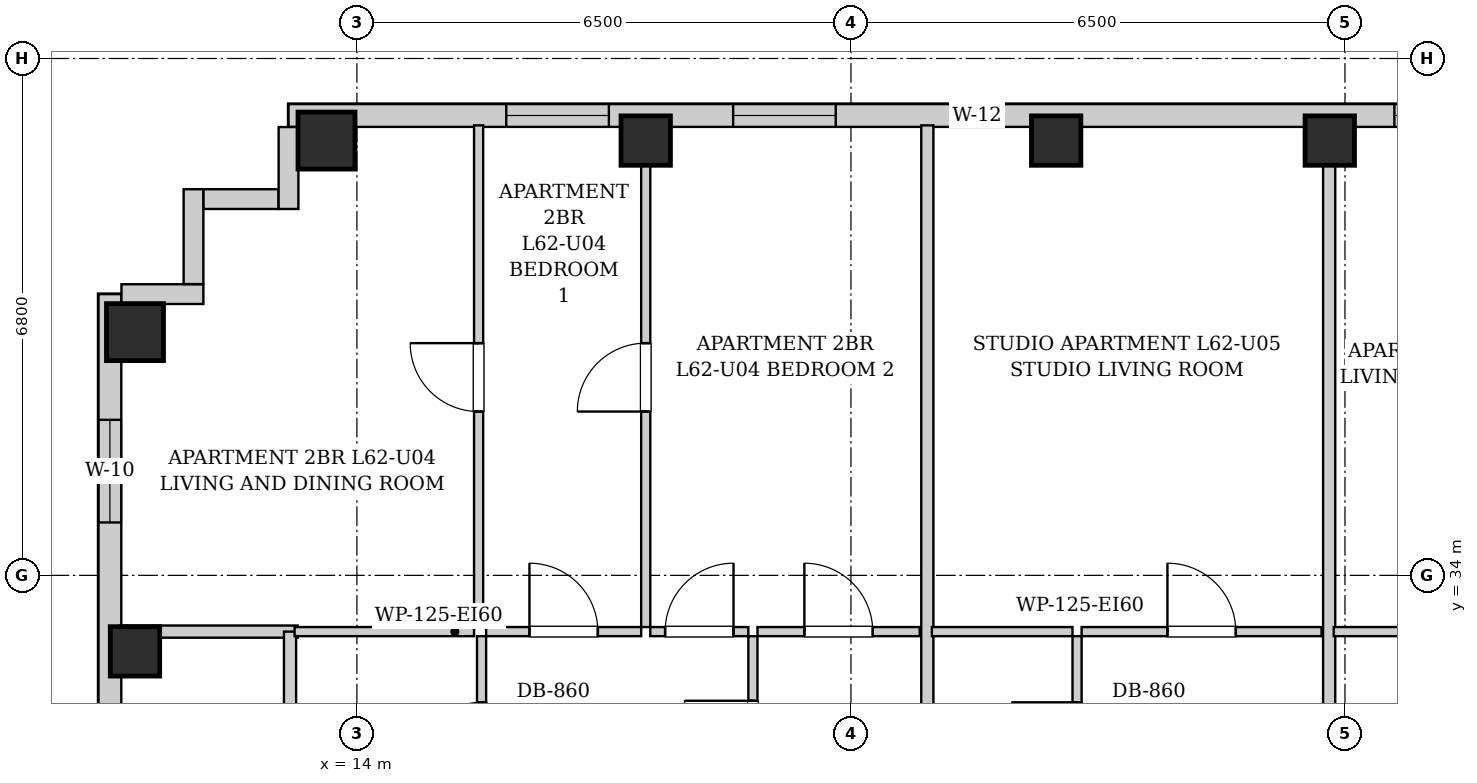
"""IFC4 building model, lengths in metres.
Left out: names, types, materials, properties, quantities, classifications, styles, units other than length and angle.
Written with IfcOpenShell. Run it as: python <this file> out.ifc"""

import sys

from ifc_helpers import new_model, si_unit, direction, frame, frame_2d, origin, origin_2d, place, context, subcontext, project, spatial, rectangle, extrude, element, fill, save


model = new_model("IFC4")
c1 = context("Model", 3, precision=1e-05, world=origin(), true_north=direction((0.0, 1.0)))
c2 = subcontext(c1, "Body", "Model", "MODEL_VIEW")
j1 = project(units=[si_unit("LENGTHUNIT", "METRE"), si_unit("PLANEANGLEUNIT", "RADIAN")], contexts=[c1])
p1 = place(None, origin())
s1 = spatial("IfcSite", under=j1, at=p1, CompositionType="ELEMENT")
p2 = place(p1, origin())
s2 = spatial("IfcBuilding", under=s1, at=p2, CompositionType="ELEMENT")
p3 = place(p2, frame((0.0, 0.0, 214.0)))
s3 = spatial("IfcBuildingStorey", under=s2, at=p3, CompositionType="ELEMENT", Elevation=214.0)
p4 = place(p3, frame((13.6, 39.72, 0.0), z_axis=(0.0, 0.0, 1.0), x_axis=(1.0, 0.0, 0.0)))
e1 = element("IfcColumn", 1, at=p4, inside=s3, PredefinedType="COLUMN", context=c2, shape_type="SweptSolid", body=[
    extrude(rectangle(XDim=0.75, YDim=0.75, at=origin_2d()), origin(), (0.0, 0.0, 1.0), 3.3),
])
for number, where, z_axis, x_axis in (
    (2, (17.8, 39.72, 0.0), (0.0, 0.0, 1.0), (1.0, 0.0, 0.0)),
    (3, (23.2, 39.72, 0.0), (0.0, 0.0, 1.0), (1.0, 0.0, 0.0)),
    (4, (26.8, 39.72, 0.0), (0.0, 0.0, 1.0), (1.0, 0.0, 0.0)),
    (5, (11.08, 33.0, 0.0), (0.0, 0.0, 1.0), (1.0, 0.0, 0.0)),
):
    element("IfcColumn", number, at=place(p3, frame(where, z_axis=z_axis, x_axis=x_axis)), inside=s3, PredefinedType="COLUMN", context=c2, shape_type="SweptSolid", body=[
        extrude(rectangle(XDim=0.65, YDim=0.65, at=origin_2d()), origin(), (0.0, 0.0, 1.0), 3.3),
    ])
p5 = place(p3, frame((11.08, 37.2, 0.0), z_axis=(0.0, 0.0, 1.0), x_axis=(1.0, 0.0, 0.0)))
e6 = element("IfcColumn", 6, at=p5, inside=s3, PredefinedType="COLUMN", context=c2, shape_type="SweptSolid", body=[
    extrude(rectangle(XDim=0.75, YDim=0.75, at=origin_2d()), origin(), (0.0, 0.0, 1.0), 3.3),
])
p6 = place(p3, frame((13.1, 40.05, 0.0), z_axis=(0.0, 0.0, 1.0), x_axis=(1.0, 0.0, 0.0)))
e7 = element("IfcWall", 7, at=p6, inside=s3, PredefinedType="SOLIDWALL", context=c2, shape_type="SweptSolid", body=[
    extrude(rectangle(XDim=16.95, YDim=0.3, at=frame_2d((8.475, 0.0))), origin(), (0.0, 0.0, 1.0), 3.04),
])
p7 = place(p6, frame((2.865, 0.0, 0.55)))
e8 = element("IfcOpeningElement", 8, at=p7, cuts=e7, PredefinedType="OPENING", context=c2, shape_type="SweptSolid", body=[
    extrude(rectangle(XDim=1.35, YDim=1.2, at=frame_2d((0.675, 0.6))), frame((0.0, 0.16, 0.0), z_axis=(0.0, -1.0, 0.0), x_axis=(1.0, 0.0, 0.0)), (0.0, 0.0, 1.0), 0.32),
])
p8 = place(p6, frame((5.85, 0.0, 0.55)))
e9 = element("IfcOpeningElement", 9, at=p8, cuts=e7, PredefinedType="OPENING", context=c2, shape_type="SweptSolid", body=[
    extrude(rectangle(XDim=1.35, YDim=1.2, at=frame_2d((0.675, 0.6))), frame((0.0, 0.16, 0.0), z_axis=(0.0, -1.0, 0.0), x_axis=(1.0, 0.0, 0.0)), (0.0, 0.0, 1.0), 0.32),
])
p9 = place(p6, frame((8.72, 0.0, 0.55)))
e10 = element("IfcOpeningElement", 10, at=p9, cuts=e7, PredefinedType="OPENING", context=c2, shape_type="SweptSolid", body=[
    extrude(rectangle(XDim=0.68, YDim=1.2, at=frame_2d((0.34, 0.6))), frame((0.0, 0.16, 0.0), z_axis=(0.0, -1.0, 0.0), x_axis=(1.0, 0.0, 0.0)), (0.0, 0.0, 1.0), 0.32),
])
p10 = place(p6, frame((14.55, 0.0, 0.55)))
e11 = element("IfcOpeningElement", 11, at=p10, cuts=e7, PredefinedType="OPENING", context=c2, shape_type="SweptSolid", body=[
    extrude(rectangle(XDim=1.35, YDim=1.2, at=frame_2d((0.675, 0.6))), frame((0.0, 0.16, 0.0), z_axis=(0.0, -1.0, 0.0), x_axis=(1.0, 0.0, 0.0)), (0.0, 0.0, 1.0), 0.32),
])
p11 = place(p3, frame((10.75, 6.3, 0.0), z_axis=(0.0, 0.0, 1.0), x_axis=(0.0, 1.0, 0.0)))
e12 = element("IfcWall", 12, at=p11, inside=s3, PredefinedType="SOLIDWALL", context=c2, shape_type="SweptSolid", body=[
    extrude(rectangle(XDim=31.4, YDim=0.3, at=frame_2d((15.7, 0.0))), origin(), (0.0, 0.0, 1.0), 3.04),
])
p12 = place(p11, frame((28.396, 0.0, 0.55)))
e13 = element("IfcOpeningElement", 13, at=p12, cuts=e12, PredefinedType="OPENING", context=c2, shape_type="SweptSolid", body=[
    extrude(rectangle(XDim=1.35, YDim=1.2, at=frame_2d((0.675, 0.6))), frame((0.0, 0.16, 0.0), z_axis=(0.0, -1.0, 0.0), x_axis=(1.0, 0.0, 0.0)), (0.0, 0.0, 1.0), 0.32),
])
p13 = place(p11, frame((10.367, 0.0, 0.55)))
e14 = element("IfcOpeningElement", 14, at=p13, cuts=e12, PredefinedType="OPENING", context=c2, shape_type="SweptSolid", body=[
    extrude(rectangle(XDim=1.35, YDim=1.2, at=frame_2d((0.675, 0.6))), frame((0.0, 0.16, 0.0), z_axis=(0.0, -1.0, 0.0), x_axis=(1.0, 0.0, 0.0)), (0.0, 0.0, 1.0), 0.32),
])
p14 = place(p11, frame((19.683, 0.0, 0.55)))
e15 = element("IfcOpeningElement", 15, at=p14, cuts=e12, PredefinedType="OPENING", context=c2, shape_type="SweptSolid", body=[
    extrude(rectangle(XDim=1.35, YDim=1.2, at=frame_2d((0.675, 0.6))), frame((0.0, 0.16, 0.0), z_axis=(0.0, -1.0, 0.0), x_axis=(1.0, 0.0, 0.0)), (0.0, 0.0, 1.0), 0.32),
])
p15 = place(p3, frame((10.902, 37.7, 0.0), z_axis=(0.0, 0.0, 1.0), x_axis=(1.0, 0.0, 0.0)))
e16 = element("IfcWall", 16, at=p15, inside=s3, PredefinedType="SOLIDWALL", context=c2, shape_type="SweptSolid", body=[
    extrude(rectangle(XDim=1.078, YDim=0.26, at=frame_2d((0.539, 0.0))), origin(), (0.0, 0.0, 1.0), 3.04),
])
p16 = place(p3, frame((11.85, 37.832, 0.0), z_axis=(0.0, 0.0, 1.0), x_axis=(0.0, 1.0, 0.0)))
e17 = element("IfcWall", 17, at=p16, inside=s3, PredefinedType="SOLIDWALL", context=c2, shape_type="SweptSolid", body=[
    extrude(rectangle(XDim=1.248, YDim=0.26, at=frame_2d((0.624, 0.0))), origin(), (0.0, 0.0, 1.0), 3.04),
])
p17 = place(p3, frame((11.982, 38.95, 0.0), z_axis=(0.0, 0.0, 1.0), x_axis=(1.0, 0.0, 0.0)))
e18 = element("IfcWall", 18, at=p17, inside=s3, PredefinedType="SOLIDWALL", context=c2, shape_type="SweptSolid", body=[
    extrude(rectangle(XDim=0.986, YDim=0.26, at=frame_2d((0.493, 0.0))), origin(), (0.0, 0.0, 1.0), 3.04),
])
p18 = place(p3, frame((13.1, 38.82, 0.0), z_axis=(0.0, 0.0, 1.0), x_axis=(0.0, 1.0, 0.0)))
e19 = element("IfcWall", 19, at=p18, inside=s3, PredefinedType="SOLIDWALL", context=c2, shape_type="SweptSolid", body=[
    extrude(rectangle(XDim=1.078, YDim=0.26, at=frame_2d((0.539, 0.0))), origin(), (0.0, 0.0, 1.0), 3.04),
])
p19 = place(p3, frame((10.88, 33.26, 0.0), z_axis=(0.0, 0.0, 1.0), x_axis=(1.0, 0.0, 0.0)))
e20 = element("IfcWall", 20, at=p19, inside=s3, PredefinedType="PARTITIONING", context=c2, shape_type="SweptSolid", body=[
    extrude(rectangle(XDim=2.34, YDim=0.16, at=frame_2d((1.17, 0.0))), origin(), (0.0, 0.0, 1.0), 3.04),
])
p20 = place(p3, frame((13.12, 30.6, 0.0), z_axis=(0.0, 0.0, 1.0), x_axis=(0.0, 1.0, 0.0)))
e21 = element("IfcWall", 21, at=p20, inside=s3, PredefinedType="PARTITIONING", context=c2, shape_type="SweptSolid", body=[
    extrude(rectangle(XDim=2.66, YDim=0.16, at=frame_2d((1.33, 0.0))), origin(), (0.0, 0.0, 1.0), 3.04),
])
p21 = place(p3, frame((15.64, 30.6, 0.0), z_axis=(0.0, 0.0, 1.0), x_axis=(0.0, 1.0, 0.0)))
e22 = element("IfcWall", 22, at=p21, inside=s3, PredefinedType="PARTITIONING", context=c2, shape_type="SweptSolid", body=[
    extrude(rectangle(XDim=2.6, YDim=0.12, at=frame_2d((1.3, 0.0))), origin(), (0.0, 0.0, 1.0), 3.04),
])
p22 = place(p21, frame((0.87, 0.0, 0.0)))
e23 = element("IfcOpeningElement", 23, at=p22, cuts=e22, PredefinedType="OPENING", context=c2, shape_type="SweptSolid", body=[
    extrude(rectangle(XDim=0.86, YDim=2.05, at=frame_2d((0.43, 1.025))), frame((0.0, 0.07, 0.0), z_axis=(0.0, -1.0, 0.0), x_axis=(1.0, 0.0, 0.0)), (0.0, 0.0, 1.0), 0.14),
])
p23 = place(p3, frame((13.18, 33.26, 0.0), z_axis=(0.0, 0.0, 1.0), x_axis=(1.0, 0.0, 0.0)))
e24 = element("IfcWall", 24, at=p23, inside=s3, PredefinedType="PARTITIONING", context=c2, shape_type="SweptSolid", body=[
    extrude(rectangle(XDim=2.361, YDim=0.12, at=frame_2d((1.181, 0.0))), origin(), (0.0, 0.0, 1.0), 3.04),
])
p24 = place(p3, frame((19.21, 30.6, 0.0), z_axis=(0.0, 0.0, 1.0), x_axis=(0.0, 1.0, 0.0)))
e25 = element("IfcWall", 25, at=p24, inside=s3, PredefinedType="PARTITIONING", context=c2, shape_type="SweptSolid", body=[
    extrude(rectangle(XDim=2.6, YDim=0.12, at=frame_2d((1.3, 0.0))), origin(), (0.0, 0.0, 1.0), 3.04),
])
p25 = place(p24, frame((0.85, 0.0, 0.0)))
e26 = element("IfcOpeningElement", 26, at=p25, cuts=e25, PredefinedType="OPENING", context=c2, shape_type="SweptSolid", body=[
    extrude(rectangle(XDim=0.9, YDim=2.05, at=frame_2d((0.45, 1.025))), frame((0.0, 0.07, 0.0), z_axis=(0.0, -1.0, 0.0), x_axis=(1.0, 0.0, 0.0)), (0.0, 0.0, 1.0), 0.14),
])
p26 = place(p3, frame((15.7, 33.26, 0.0), z_axis=(0.0, 0.0, 1.0), x_axis=(1.0, 0.0, 0.0)))
e27 = element("IfcWall", 27, at=p26, inside=s3, PredefinedType="PARTITIONING", context=c2, shape_type="SweptSolid", body=[
    extrude(rectangle(XDim=2.04, YDim=0.12, at=frame_2d((1.02, 0.0))), origin(), (0.0, 0.0, 1.0), 3.04),
])
p27 = place(p26, frame((0.57, 0.0, 0.0)))
e28 = element("IfcOpeningElement", 28, at=p27, cuts=e27, PredefinedType="OPENING", context=c2, shape_type="SweptSolid", body=[
    extrude(rectangle(XDim=0.9, YDim=2.05, at=frame_2d((0.45, 1.025))), frame((0.0, 0.07, 0.0), z_axis=(0.0, -1.0, 0.0), x_axis=(1.0, 0.0, 0.0)), (0.0, 0.0, 1.0), 0.14),
])
p28 = place(p3, frame((17.86, 33.26, 0.0), z_axis=(0.0, 0.0, 1.0), x_axis=(1.0, 0.0, 0.0)))
e29 = element("IfcWall", 29, at=p28, inside=s3, PredefinedType="PARTITIONING", context=c2, shape_type="SweptSolid", body=[
    extrude(rectangle(XDim=1.29, YDim=0.12, at=frame_2d((0.645, 0.0))), origin(), (0.0, 0.0, 1.0), 3.04),
])
p29 = place(p28, frame((0.195, 0.0, 0.0)))
e30 = element("IfcOpeningElement", 30, at=p29, cuts=e29, PredefinedType="OPENING", context=c2, shape_type="SweptSolid", body=[
    extrude(rectangle(XDim=0.9, YDim=2.05, at=frame_2d((0.45, 1.025))), frame((0.0, 0.07, 0.0), z_axis=(0.0, -1.0, 0.0), x_axis=(1.0, 0.0, 0.0)), (0.0, 0.0, 1.0), 0.14),
])
p30 = place(p3, frame((19.27, 33.26, 0.0), z_axis=(0.0, 0.0, 1.0), x_axis=(1.0, 0.0, 0.0)))
e31 = element("IfcWall", 31, at=p30, inside=s3, PredefinedType="PARTITIONING", context=c2, shape_type="SweptSolid", body=[
    extrude(rectangle(XDim=2.135, YDim=0.12, at=frame_2d((1.067, 0.0))), origin(), (0.0, 0.0, 1.0), 3.04),
])
p31 = place(p30, frame((0.617, 0.0, 0.0)))
e32 = element("IfcOpeningElement", 32, at=p31, cuts=e31, PredefinedType="OPENING", context=c2, shape_type="SweptSolid", body=[
    extrude(rectangle(XDim=0.9, YDim=2.05, at=frame_2d((0.45, 1.025))), frame((0.0, 0.07, 0.0), z_axis=(0.0, -1.0, 0.0), x_axis=(1.0, 0.0, 0.0)), (0.0, 0.0, 1.0), 0.14),
])
p32 = place(p3, frame((15.601, 33.32, 0.0), z_axis=(0.0, 0.0, 1.0), x_axis=(0.0, 1.0, 0.0)))
e33 = element("IfcWall", 33, at=p32, inside=s3, PredefinedType="PARTITIONING", context=c2, shape_type="SweptSolid", body=[
    extrude(rectangle(XDim=6.6, YDim=0.12, at=frame_2d((3.3, 0.0))), origin(), (0.0, 0.0, 1.0), 3.04),
])
p33 = place(p32, frame((2.835, 0.0, 0.0)))
e34 = element("IfcOpeningElement", 34, at=p33, cuts=e33, PredefinedType="OPENING", context=c2, shape_type="SweptSolid", body=[
    extrude(rectangle(XDim=0.9, YDim=2.05, at=frame_2d((0.45, 1.025))), frame((0.0, 0.07, 0.0), z_axis=(0.0, -1.0, 0.0), x_axis=(1.0, 0.0, 0.0)), (0.0, 0.0, 1.0), 0.14),
])
p34 = place(p3, frame((17.8, 33.32, 0.0), z_axis=(0.0, 0.0, 1.0), x_axis=(0.0, 1.0, 0.0)))
e35 = element("IfcWall", 35, at=p34, inside=s3, PredefinedType="PARTITIONING", context=c2, shape_type="SweptSolid", body=[
    extrude(rectangle(XDim=6.6, YDim=0.12, at=frame_2d((3.3, 0.0))), origin(), (0.0, 0.0, 1.0), 2.556),
])
p35 = place(p34, frame((2.835, 0.0, 0.0)))
e36 = element("IfcOpeningElement", 36, at=p35, cuts=e35, PredefinedType="OPENING", context=c2, shape_type="SweptSolid", body=[
    extrude(rectangle(XDim=0.9, YDim=2.05, at=frame_2d((0.45, 1.025))), frame((0.0, 0.07, 0.0), z_axis=(0.0, -1.0, 0.0), x_axis=(1.0, 0.0, 0.0)), (0.0, 0.0, 1.0), 0.14),
])
p36 = place(p3, frame((21.505, 30.6, 0.0), z_axis=(0.0, 0.0, 1.0), x_axis=(0.0, 1.0, 0.0)))
e37 = element("IfcWall", 37, at=p36, inside=s3, PredefinedType="PARTITIONING", context=c2, shape_type="SweptSolid", body=[
    extrude(rectangle(XDim=9.32, YDim=0.16, at=frame_2d((4.66, 0.0))), origin(), (0.0, 0.0, 1.0), 3.04),
])
p37 = place(p3, frame((23.475, 30.6, 0.0), z_axis=(0.0, 0.0, 1.0), x_axis=(0.0, 1.0, 0.0)))
e38 = element("IfcWall", 38, at=p37, inside=s3, PredefinedType="PARTITIONING", context=c2, shape_type="SweptSolid", body=[
    extrude(rectangle(XDim=2.6, YDim=0.12, at=frame_2d((1.3, 0.0))), origin(), (0.0, 0.0, 1.0), 3.04),
])
p38 = place(p37, frame((0.87, 0.0, 0.0)))
e39 = element("IfcOpeningElement", 39, at=p38, cuts=e38, PredefinedType="OPENING", context=c2, shape_type="SweptSolid", body=[
    extrude(rectangle(XDim=0.86, YDim=2.05, at=frame_2d((0.43, 1.025))), frame((0.0, 0.07, 0.0), z_axis=(0.0, -1.0, 0.0), x_axis=(1.0, 0.0, 0.0)), (0.0, 0.0, 1.0), 0.14),
])
p39 = place(p3, frame((21.565, 33.26, 0.0), z_axis=(0.0, 0.0, 1.0), x_axis=(1.0, 0.0, 0.0)))
e40 = element("IfcWall", 40, at=p39, inside=s3, PredefinedType="PARTITIONING", context=c2, shape_type="SweptSolid", body=[
    extrude(rectangle(XDim=1.85, YDim=0.12, at=frame_2d((0.925, 0.0))), origin(), (0.0, 0.0, 1.0), 3.04),
])
p40 = place(p3, frame((23.535, 33.26, 0.0), z_axis=(0.0, 0.0, 1.0), x_axis=(1.0, 0.0, 0.0)))
e41 = element("IfcWall", 41, at=p40, inside=s3, PredefinedType="PARTITIONING", context=c2, shape_type="SweptSolid", body=[
    extrude(rectangle(XDim=3.157, YDim=0.12, at=frame_2d((1.579, 0.0))), origin(), (0.0, 0.0, 1.0), 3.04),
])
p41 = place(p40, frame((1.129, 0.0, 0.0)))
e42 = element("IfcOpeningElement", 42, at=p41, cuts=e41, PredefinedType="OPENING", context=c2, shape_type="SweptSolid", body=[
    extrude(rectangle(XDim=0.9, YDim=2.05, at=frame_2d((0.45, 1.025))), frame((0.0, 0.07, 0.0), z_axis=(0.0, -1.0, 0.0), x_axis=(1.0, 0.0, 0.0)), (0.0, 0.0, 1.0), 0.14),
])
p42 = place(p3, frame((26.792, 30.6, 0.0), z_axis=(0.0, 0.0, 1.0), x_axis=(0.0, 1.0, 0.0)))
e43 = element("IfcWall", 43, at=p42, inside=s3, PredefinedType="PARTITIONING", context=c2, shape_type="SweptSolid", body=[
    extrude(rectangle(XDim=9.32, YDim=0.16, at=frame_2d((4.66, 0.0))), origin(), (0.0, 0.0, 1.0), 3.04),
])
p43 = place(p3, frame((26.852, 33.26, 0.0), z_axis=(0.0, 0.0, 1.0), x_axis=(1.0, 0.0, 0.0)))
e44 = element("IfcWall", 44, at=p43, inside=s3, PredefinedType="PARTITIONING", context=c2, shape_type="SweptSolid", body=[
    extrude(rectangle(XDim=2.4, YDim=0.12, at=frame_2d((1.2, 0.0))), origin(), (0.0, 0.0, 1.0), 3.04),
])
p44 = place(p22, origin())
e45 = element("IfcDoor", 45, at=p44, inside=s3, OperationType="SINGLE_SWING_LEFT", PredefinedType="DOOR", context=c2, shape_type="SweptSolid", body=[
    extrude(rectangle(XDim=0.86, YDim=2.05, at=frame_2d((0.43, 1.025))), frame((0.0, 0.025, 0.0), z_axis=(0.0, -1.0, 0.0), x_axis=(1.0, 0.0, 0.0)), (0.0, 0.0, 1.0), 0.05),
])
fill(e23, e45)
p45 = place(p25, origin())
e46 = element("IfcDoor", 46, at=p45, inside=s3, OperationType="SINGLE_SWING_RIGHT", PredefinedType="DOOR", context=c2, shape_type="SweptSolid", body=[
    extrude(rectangle(XDim=0.9, YDim=2.05, at=frame_2d((0.45, 1.025))), frame((0.0, 0.025, 0.0), z_axis=(0.0, -1.0, 0.0), x_axis=(1.0, 0.0, 0.0)), (0.0, 0.0, 1.0), 0.05),
])
fill(e26, e46)
p46 = place(p27, origin())
e47 = element("IfcDoor", 47, at=p46, inside=s3, OperationType="SINGLE_SWING_LEFT", PredefinedType="DOOR", context=c2, shape_type="SweptSolid", body=[
    extrude(rectangle(XDim=0.9, YDim=2.05, at=frame_2d((0.45, 1.025))), frame((0.0, 0.025, 0.0), z_axis=(0.0, -1.0, 0.0), x_axis=(1.0, 0.0, 0.0)), (0.0, 0.0, 1.0), 0.05),
])
fill(e28, e47)
p47 = place(p29, origin())
e48 = element("IfcDoor", 48, at=p47, inside=s3, OperationType="SINGLE_SWING_RIGHT", PredefinedType="DOOR", context=c2, shape_type="SweptSolid", body=[
    extrude(rectangle(XDim=0.9, YDim=2.05, at=frame_2d((0.45, 1.025))), frame((0.0, 0.025, 0.0), z_axis=(0.0, -1.0, 0.0), x_axis=(1.0, 0.0, 0.0)), (0.0, 0.0, 1.0), 0.05),
])
fill(e30, e48)
p48 = place(p31, origin())
e49 = element("IfcDoor", 49, at=p48, inside=s3, OperationType="SINGLE_SWING_LEFT", PredefinedType="DOOR", context=c2, shape_type="SweptSolid", body=[
    extrude(rectangle(XDim=0.9, YDim=2.05, at=frame_2d((0.45, 1.025))), frame((0.0, 0.025, 0.0), z_axis=(0.0, -1.0, 0.0), x_axis=(1.0, 0.0, 0.0)), (0.0, 0.0, 1.0), 0.05),
])
fill(e32, e49)
p49 = place(p33, origin())
e50 = element("IfcDoor", 50, at=p49, inside=s3, OperationType="SINGLE_SWING_RIGHT", PredefinedType="DOOR", context=c2, shape_type="SweptSolid", body=[
    extrude(rectangle(XDim=0.9, YDim=2.05, at=frame_2d((0.45, 1.025))), frame((0.0, 0.025, 0.0), z_axis=(0.0, -1.0, 0.0), x_axis=(1.0, 0.0, 0.0)), (0.0, 0.0, 1.0), 0.05),
])
fill(e34, e50)
p50 = place(p35, origin())
e51 = element("IfcDoor", 51, at=p50, inside=s3, OperationType="SINGLE_SWING_LEFT", PredefinedType="DOOR", context=c2, shape_type="SweptSolid", body=[
    extrude(rectangle(XDim=0.9, YDim=2.05, at=frame_2d((0.45, 1.025))), frame((0.0, 0.025, 0.0), z_axis=(0.0, -1.0, 0.0), x_axis=(1.0, 0.0, 0.0)), (0.0, 0.0, 1.0), 0.05),
])
fill(e36, e51)
p51 = place(p38, origin())
e52 = element("IfcDoor", 52, at=p51, inside=s3, OperationType="SINGLE_SWING_RIGHT", PredefinedType="DOOR", context=c2, shape_type="SweptSolid", body=[
    extrude(rectangle(XDim=0.86, YDim=2.05, at=frame_2d((0.43, 1.025))), frame((0.0, 0.025, 0.0), z_axis=(0.0, -1.0, 0.0), x_axis=(1.0, 0.0, 0.0)), (0.0, 0.0, 1.0), 0.05),
])
fill(e39, e52)
p52 = place(p41, origin())
e53 = element("IfcDoor", 53, at=p52, inside=s3, OperationType="SINGLE_SWING_LEFT", PredefinedType="DOOR", context=c2, shape_type="SweptSolid", body=[
    extrude(rectangle(XDim=0.9, YDim=2.05, at=frame_2d((0.45, 1.025))), frame((0.0, 0.025, 0.0), z_axis=(0.0, -1.0, 0.0), x_axis=(1.0, 0.0, 0.0)), (0.0, 0.0, 1.0), 0.05),
])
fill(e42, e53)
p53 = place(p12, origin())
e54 = element("IfcWindow", 54, at=p53, inside=s3, PartitioningType="SINGLE_PANEL", PredefinedType="WINDOW", context=c2, shape_type="SweptSolid", body=[
    extrude(rectangle(XDim=1.35, YDim=1.2, at=frame_2d((0.675, 0.6))), frame((0.0, 0.03, 0.0), z_axis=(0.0, -1.0, 0.0), x_axis=(1.0, 0.0, 0.0)), (0.0, 0.0, 1.0), 0.06),
])
fill(e13, e54)
p54 = place(p7, origin())
e55 = element("IfcWindow", 55, at=p54, inside=s3, PartitioningType="SINGLE_PANEL", PredefinedType="WINDOW", context=c2, shape_type="SweptSolid", body=[
    extrude(rectangle(XDim=1.35, YDim=1.2, at=frame_2d((0.675, 0.6))), frame((0.0, 0.03, 0.0), z_axis=(0.0, -1.0, 0.0), x_axis=(1.0, 0.0, 0.0)), (0.0, 0.0, 1.0), 0.06),
])
fill(e8, e55)
p55 = place(p8, origin())
e56 = element("IfcWindow", 56, at=p55, inside=s3, PartitioningType="SINGLE_PANEL", PredefinedType="WINDOW", context=c2, shape_type="SweptSolid", body=[
    extrude(rectangle(XDim=1.35, YDim=1.2, at=frame_2d((0.675, 0.6))), frame((0.0, 0.03, 0.0), z_axis=(0.0, -1.0, 0.0), x_axis=(1.0, 0.0, 0.0)), (0.0, 0.0, 1.0), 0.06),
])
fill(e9, e56)
p56 = place(p9, origin())
e57 = element("IfcWindow", 57, at=p56, inside=s3, PartitioningType="SINGLE_PANEL", PredefinedType="WINDOW", context=c2, shape_type="SweptSolid", body=[
    extrude(rectangle(XDim=0.68, YDim=1.2, at=frame_2d((0.34, 0.6))), frame((0.0, 0.03, 0.0), z_axis=(0.0, -1.0, 0.0), x_axis=(1.0, 0.0, 0.0)), (0.0, 0.0, 1.0), 0.06),
])
fill(e10, e57)
p57 = place(p10, origin())
e58 = element("IfcWindow", 58, at=p57, inside=s3, PartitioningType="SINGLE_PANEL", PredefinedType="WINDOW", context=c2, shape_type="SweptSolid", body=[
    extrude(rectangle(XDim=1.35, YDim=1.2, at=frame_2d((0.675, 0.6))), frame((0.0, 0.03, 0.0), z_axis=(0.0, -1.0, 0.0), x_axis=(1.0, 0.0, 0.0)), (0.0, 0.0, 1.0), 0.06),
])
fill(e11, e58)
save(model, sys.argv[1])
